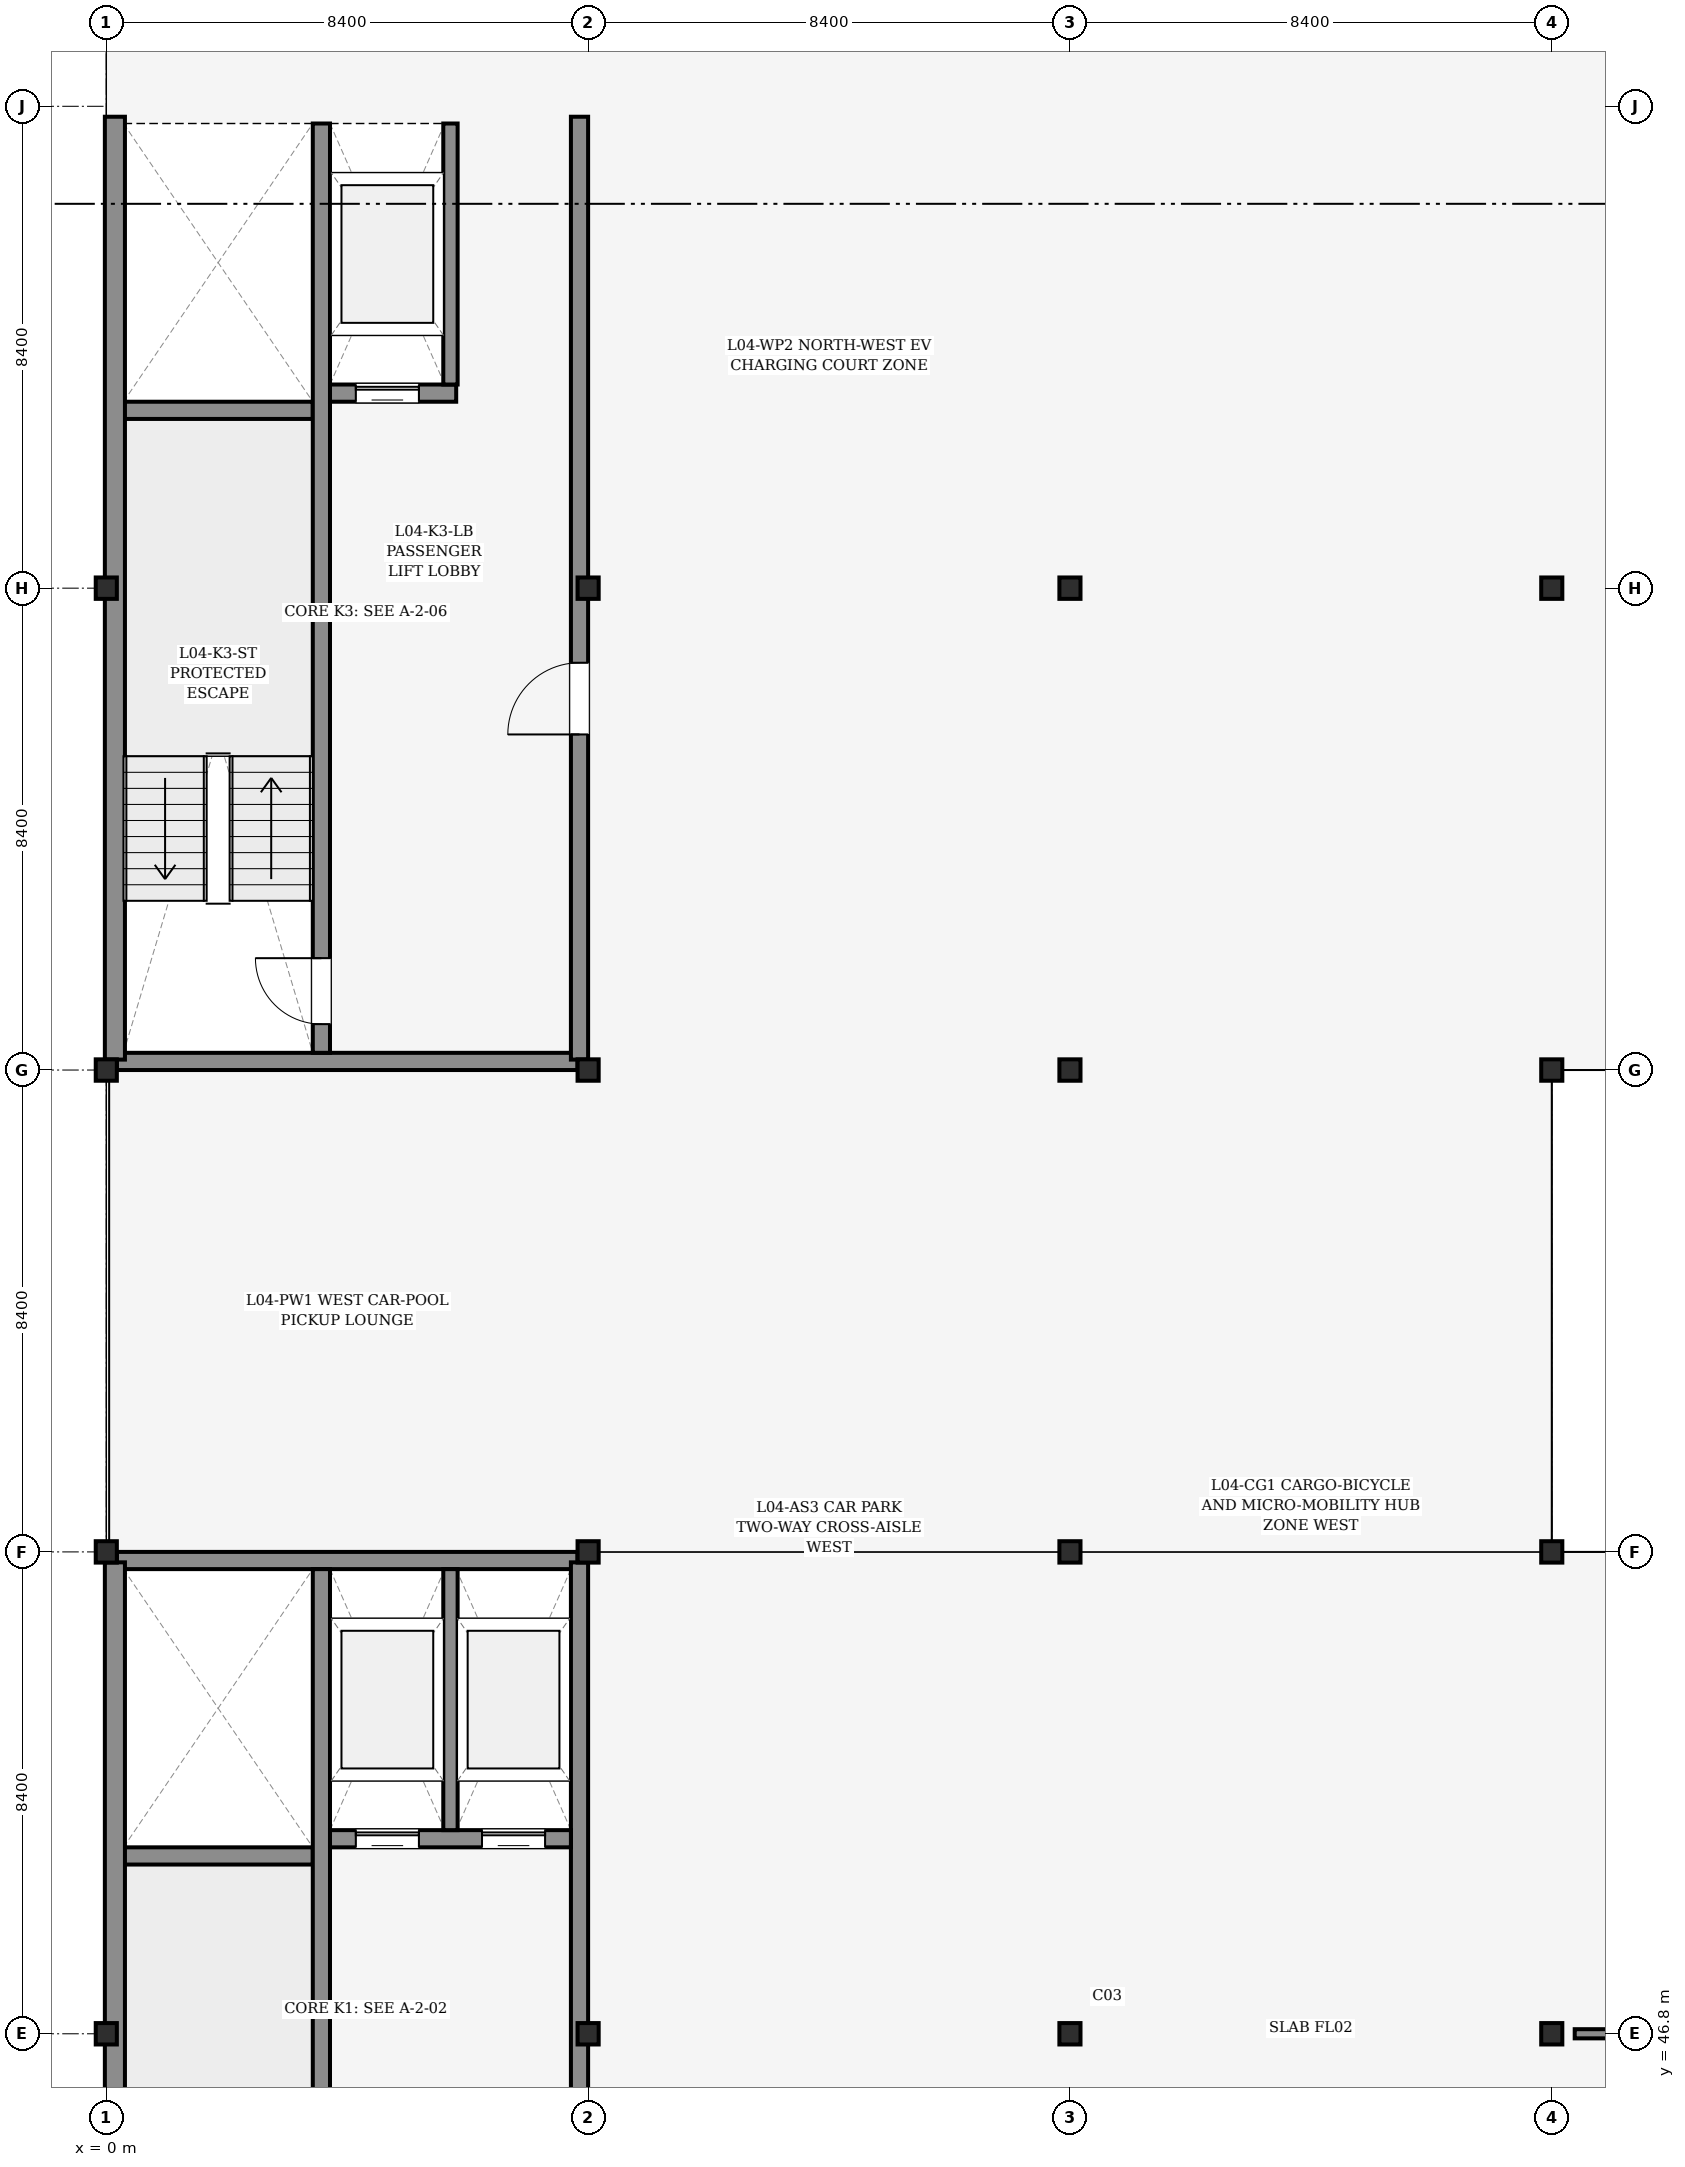
"""IFC4 building model, lengths in metres.
Left out: names, types, materials, properties, quantities, classifications, styles, units other than length and angle.
Written with IfcOpenShell. Run it as: python <this file> out.ifc"""

import sys

from ifc_helpers import new_model, si_unit, direction, frame, frame_2d, origin, origin_2d, place, context, subcontext, project, spatial, rectangle, i_section, extrude, element, fill, save


model = new_model("IFC4")
c1 = context("Model", 3, precision=1e-05, world=origin(), true_north=direction((0.0, 1.0)))
c2 = subcontext(c1, "Body", "Model", "MODEL_VIEW")
j1 = project(units=[si_unit("LENGTHUNIT", "METRE"), si_unit("PLANEANGLEUNIT", "RADIAN")], contexts=[c1])
p1 = place(None, origin())
s1 = spatial("IfcSite", under=j1, at=p1, CompositionType="ELEMENT")
p2 = place(p1, origin())
s2 = spatial("IfcBuilding", under=s1, at=p2, CompositionType="ELEMENT")
p3 = place(p2, frame((0.0, 0.0, 16.2)))
s3 = spatial("IfcBuildingStorey", under=s2, at=p3, CompositionType="ELEMENT", Elevation=16.2)
for number, where, z_axis, x_axis in (
    (1, (0.0, 46.8, 0.0), (0.0, 0.0, 1.0), (1.0, 0.0, 0.0)),
    (2, (0.0, 55.2, 0.0), (0.0, 0.0, 1.0), (1.0, 0.0, 0.0)),
    (3, (0.0, 63.6, 0.0), (0.0, 0.0, 1.0), (1.0, 0.0, 0.0)),
    (4, (0.0, 72.0, 0.0), (0.0, 0.0, 1.0), (1.0, 0.0, 0.0)),
    (5, (0.0, 80.4, 0.0), (0.0, 0.0, 1.0), (1.0, 0.0, 0.0)),
    (6, (8.4, 46.8, 0.0), (0.0, 0.0, 1.0), (1.0, 0.0, 0.0)),
    (7, (8.4, 55.2, 0.0), (0.0, 0.0, 1.0), (1.0, 0.0, 0.0)),
    (8, (8.4, 63.6, 0.0), (0.0, 0.0, 1.0), (1.0, 0.0, 0.0)),
    (9, (8.4, 72.0, 0.0), (0.0, 0.0, 1.0), (1.0, 0.0, 0.0)),
    (10, (8.4, 80.4, 0.0), (0.0, 0.0, 1.0), (1.0, 0.0, 0.0)),
    (11, (16.8, 46.8, 0.0), (0.0, 0.0, 1.0), (1.0, 0.0, 0.0)),
    (12, (16.8, 55.2, 0.0), (0.0, 0.0, 1.0), (1.0, 0.0, 0.0)),
    (13, (16.8, 63.6, 0.0), (0.0, 0.0, 1.0), (1.0, 0.0, 0.0)),
    (14, (16.8, 72.0, 0.0), (0.0, 0.0, 1.0), (1.0, 0.0, 0.0)),
    (15, (16.8, 80.4, 0.0), (0.0, 0.0, 1.0), (1.0, 0.0, 0.0)),
    (16, (25.2, 46.8, 0.0), (0.0, 0.0, 1.0), (1.0, 0.0, 0.0)),
    (17, (25.2, 55.2, 0.0), (0.0, 0.0, 1.0), (1.0, 0.0, 0.0)),
    (18, (25.2, 63.6, 0.0), (0.0, 0.0, 1.0), (1.0, 0.0, 0.0)),
    (19, (25.2, 72.0, 0.0), (0.0, 0.0, 1.0), (1.0, 0.0, 0.0)),
    (20, (25.2, 80.4, 0.0), (0.0, 0.0, 1.0), (1.0, 0.0, 0.0)),
):
    element("IfcColumn", number, at=place(p3, frame(where, z_axis=z_axis, x_axis=x_axis)), inside=s3, PredefinedType="COLUMN", context=c2, shape_type="SweptSolid", body=[
        extrude(i_section(OverallWidth=0.373, OverallDepth=0.368, WebThickness=0.014, FlangeThickness=0.024, FilletRadius=0.015, at=origin_2d()), origin(), (0.0, 0.0, 1.0), 3.6),
    ])
p4 = place(p3, frame((0.185, 55.05, 0.0), z_axis=(0.0, 0.0, 1.0), x_axis=(1.0, 0.0, 0.0)))
e21 = element("IfcWall", 21, at=p4, inside=s3, PredefinedType="SHEAR", context=c2, shape_type="SweptSolid", body=[
    extrude(rectangle(XDim=8.031, YDim=0.3, at=frame_2d((4.016, 0.0))), origin(), (0.0, 0.0, 1.0), 3.38),
])
p5 = place(p3, frame((0.3, 49.9, 0.0), z_axis=(0.0, 0.0, 1.0), x_axis=(1.0, 0.0, 0.0)))
e22 = element("IfcWall", 22, at=p5, inside=s3, PredefinedType="SHEAR", context=c2, shape_type="SweptSolid", body=[
    extrude(rectangle(XDim=3.3, YDim=0.3, at=frame_2d((1.65, 0.0))), origin(), (0.0, 0.0, 1.0), 3.38),
])
p6 = place(p3, frame((0.15, 38.582, 0.0), z_axis=(0.0, 0.0, 1.0), x_axis=(0.0, 1.0, 0.0)))
e23 = element("IfcWall", 23, at=p6, inside=s3, PredefinedType="SHEAR", context=c2, shape_type="SweptSolid", body=[
    extrude(rectangle(XDim=16.436, YDim=0.35, at=frame_2d((8.218, 0.0))), origin(), (0.0, 0.0, 1.0), 3.38),
])
p7 = place(p3, frame((8.25, 38.582, 0.0), z_axis=(0.0, 0.0, 1.0), x_axis=(0.0, 1.0, 0.0)))
e24 = element("IfcWall", 24, at=p7, inside=s3, PredefinedType="SHEAR", context=c2, shape_type="SweptSolid", body=[
    extrude(rectangle(XDim=16.436, YDim=0.3, at=frame_2d((8.218, 0.0))), origin(), (0.0, 0.0, 1.0), 3.38),
])
p8 = place(p7, frame((5.668, 0.0, 0.0)))
e25 = element("IfcOpeningElement", 25, at=p8, cuts=e24, PredefinedType="OPENING", context=c2, shape_type="SweptSolid", body=[
    extrude(rectangle(XDim=1.3, YDim=2.2, at=frame_2d((0.65, 1.1))), frame((0.0, 0.16, 0.0), z_axis=(0.0, -1.0, 0.0), x_axis=(1.0, 0.0, 0.0)), (0.0, 0.0, 1.0), 0.32),
])
p9 = place(p3, frame((3.75, 38.7, 0.0), z_axis=(0.0, 0.0, 1.0), x_axis=(0.0, 1.0, 0.0)))
e26 = element("IfcWall", 26, at=p9, inside=s3, PredefinedType="SHEAR", context=c2, shape_type="SweptSolid", body=[
    extrude(rectangle(XDim=16.2, YDim=0.3, at=frame_2d((8.1, 0.0))), origin(), (0.0, 0.0, 1.0), 3.38),
])
p10 = place(p9, frame((0.5, 0.0, 0.0)))
e27 = element("IfcOpeningElement", 27, at=p10, cuts=e26, PredefinedType="OPENING", context=c2, shape_type="SweptSolid", body=[
    extrude(rectangle(XDim=1.15, YDim=2.15, at=frame_2d((0.575, 1.075))), frame((0.0, 0.16, 0.0), z_axis=(0.0, -1.0, 0.0), x_axis=(1.0, 0.0, 0.0)), (0.0, 0.0, 1.0), 0.32),
])
p11 = place(p3, frame((3.9, 50.2, 0.0), z_axis=(0.0, 0.0, 1.0), x_axis=(1.0, 0.0, 0.0)))
e28 = element("IfcWall", 28, at=p11, inside=s3, PredefinedType="SHEAR", context=c2, shape_type="SweptSolid", body=[
    extrude(rectangle(XDim=4.2, YDim=0.3, at=frame_2d((2.1, 0.0))), origin(), (0.0, 0.0, 1.0), 3.38),
])
p12 = place(p11, frame((0.45, 0.0, 0.0)))
e29 = element("IfcOpeningElement", 29, at=p12, cuts=e28, PredefinedType="OPENING", context=c2, shape_type="SweptSolid", body=[
    extrude(rectangle(XDim=1.1, YDim=2.2, at=frame_2d((0.55, 1.1))), frame((0.0, 0.16, 0.0), z_axis=(0.0, -1.0, 0.0), x_axis=(1.0, 0.0, 0.0)), (0.0, 0.0, 1.0), 0.32),
])
p13 = place(p11, frame((2.65, 0.0, 0.0)))
e30 = element("IfcOpeningElement", 30, at=p13, cuts=e28, PredefinedType="OPENING", context=c2, shape_type="SweptSolid", body=[
    extrude(rectangle(XDim=1.1, YDim=2.2, at=frame_2d((0.55, 1.1))), frame((0.0, 0.16, 0.0), z_axis=(0.0, -1.0, 0.0), x_axis=(1.0, 0.0, 0.0)), (0.0, 0.0, 1.0), 0.32),
])
p14 = place(p3, frame((6.0, 50.35, 0.0), z_axis=(0.0, 0.0, 1.0), x_axis=(0.0, 1.0, 0.0)))
e31 = element("IfcWall", 31, at=p14, inside=s3, PredefinedType="PARTITIONING", context=c2, shape_type="SweptSolid", body=[
    extrude(rectangle(XDim=4.55, YDim=0.25, at=frame_2d((2.275, 0.0))), origin(), (0.0, 0.0, 1.0), 2.525),
])
for number, where, z_axis, x_axis in (
    (32, (0.185, 63.75, 0.0), (0.0, 0.0, 1.0), (1.0, 0.0, 0.0)),
    (33, (0.185, 80.25, 0.0), (0.0, 0.0, 1.0), (1.0, 0.0, 0.0)),
):
    element("IfcWall", number, at=place(p3, frame(where, z_axis=z_axis, x_axis=x_axis)), inside=s3, PredefinedType="SHEAR", context=c2, shape_type="SweptSolid", body=[
        extrude(rectangle(XDim=8.031, YDim=0.3, at=frame_2d((4.016, 0.0))), origin(), (0.0, 0.0, 1.0), 3.38),
    ])
p15 = place(p3, frame((0.3, 75.1, 0.0), z_axis=(0.0, 0.0, 1.0), x_axis=(1.0, 0.0, 0.0)))
e34 = element("IfcWall", 34, at=p15, inside=s3, PredefinedType="SHEAR", context=c2, shape_type="SweptSolid", body=[
    extrude(rectangle(XDim=3.3, YDim=0.3, at=frame_2d((1.65, 0.0))), origin(), (0.0, 0.0, 1.0), 3.38),
])
p16 = place(p3, frame((0.15, 63.782, 0.0), z_axis=(0.0, 0.0, 1.0), x_axis=(0.0, 1.0, 0.0)))
e35 = element("IfcWall", 35, at=p16, inside=s3, PredefinedType="SHEAR", context=c2, shape_type="SweptSolid", body=[
    extrude(rectangle(XDim=16.436, YDim=0.35, at=frame_2d((8.218, 0.0))), origin(), (0.0, 0.0, 1.0), 3.38),
])
p17 = place(p3, frame((8.25, 63.782, 0.0), z_axis=(0.0, 0.0, 1.0), x_axis=(0.0, 1.0, 0.0)))
e36 = element("IfcWall", 36, at=p17, inside=s3, PredefinedType="SHEAR", context=c2, shape_type="SweptSolid", body=[
    extrude(rectangle(XDim=16.436, YDim=0.3, at=frame_2d((8.218, 0.0))), origin(), (0.0, 0.0, 1.0), 3.38),
])
p18 = place(p17, frame((5.668, 0.0, 0.0)))
e37 = element("IfcOpeningElement", 37, at=p18, cuts=e36, PredefinedType="OPENING", context=c2, shape_type="SweptSolid", body=[
    extrude(rectangle(XDim=1.25, YDim=2.15, at=frame_2d((0.625, 1.075))), frame((0.0, 0.16, 0.0), z_axis=(0.0, -1.0, 0.0), x_axis=(1.0, 0.0, 0.0)), (0.0, 0.0, 1.0), 0.32),
])
p19 = place(p3, frame((3.75, 63.9, 0.0), z_axis=(0.0, 0.0, 1.0), x_axis=(0.0, 1.0, 0.0)))
e38 = element("IfcWall", 38, at=p19, inside=s3, PredefinedType="SHEAR", context=c2, shape_type="SweptSolid", body=[
    extrude(rectangle(XDim=16.2, YDim=0.3, at=frame_2d((8.1, 0.0))), origin(), (0.0, 0.0, 1.0), 3.38),
])
p20 = place(p19, frame((0.5, 0.0, 0.0)))
e39 = element("IfcOpeningElement", 39, at=p20, cuts=e38, PredefinedType="OPENING", context=c2, shape_type="SweptSolid", body=[
    extrude(rectangle(XDim=1.15, YDim=2.15, at=frame_2d((0.575, 1.075))), frame((0.0, 0.16, 0.0), z_axis=(0.0, -1.0, 0.0), x_axis=(1.0, 0.0, 0.0)), (0.0, 0.0, 1.0), 0.32),
])
p21 = place(p3, frame((3.9, 75.4, 0.0), z_axis=(0.0, 0.0, 1.0), x_axis=(1.0, 0.0, 0.0)))
e40 = element("IfcWall", 40, at=p21, inside=s3, PredefinedType="SHEAR", context=c2, shape_type="SweptSolid", body=[
    extrude(rectangle(XDim=2.2, YDim=0.3, at=frame_2d((1.1, 0.0))), origin(), (0.0, 0.0, 1.0), 3.38),
])
p22 = place(p21, frame((0.45, 0.0, 0.0)))
e41 = element("IfcOpeningElement", 41, at=p22, cuts=e40, PredefinedType="OPENING", context=c2, shape_type="SweptSolid", body=[
    extrude(rectangle(XDim=1.1, YDim=2.2, at=frame_2d((0.55, 1.1))), frame((0.0, 0.16, 0.0), z_axis=(0.0, -1.0, 0.0), x_axis=(1.0, 0.0, 0.0)), (0.0, 0.0, 1.0), 0.32),
])
p23 = place(p3, frame((6.0, 75.55, 0.0), z_axis=(0.0, 0.0, 1.0), x_axis=(0.0, 1.0, 0.0)))
e42 = element("IfcWall", 42, at=p23, inside=s3, PredefinedType="PARTITIONING", context=c2, shape_type="SweptSolid", body=[
    extrude(rectangle(XDim=4.55, YDim=0.25, at=frame_2d((2.275, 0.0))), origin(), (0.0, 0.0, 1.0), 2.525),
])
p24 = place(p3, frame((25.6, 46.8, 0.0), z_axis=(0.0, 0.0, 1.0), x_axis=(1.0, 0.0, 0.0)))
e43 = element("IfcWall", 43, at=p24, inside=s3, PredefinedType="PARTITIONING", context=c2, shape_type="SweptSolid", body=[
    extrude(rectangle(XDim=32.8, YDim=0.16, at=frame_2d((16.4, 0.0))), origin(), (0.0, 0.0, 1.0), 2.525),
])
p25 = place(p24, frame((4.0, 0.0, 0.0)))
e44 = element("IfcOpeningElement", 44, at=p25, cuts=e43, PredefinedType="OPENING", context=c2, shape_type="SweptSolid", body=[
    extrude(rectangle(XDim=1.2, YDim=2.15, at=frame_2d((0.6, 1.075))), frame((0.0, 0.09, 0.0), z_axis=(0.0, -1.0, 0.0), x_axis=(1.0, 0.0, 0.0)), (0.0, 0.0, 1.0), 0.18),
])
p26 = place(p12, origin())
e45 = element("IfcDoor", 45, at=p26, inside=s3, OperationType="SLIDING_TO_LEFT", PredefinedType="DOOR", context=c2, shape_type="SweptSolid", body=[
    extrude(rectangle(XDim=1.1, YDim=2.2, at=frame_2d((0.55, 1.1))), frame((0.0, 0.025, 0.0), z_axis=(0.0, -1.0, 0.0), x_axis=(1.0, 0.0, 0.0)), (0.0, 0.0, 1.0), 0.05),
])
fill(e29, e45)
p27 = place(p13, origin())
e46 = element("IfcDoor", 46, at=p27, inside=s3, OperationType="SLIDING_TO_LEFT", PredefinedType="DOOR", context=c2, shape_type="SweptSolid", body=[
    extrude(rectangle(XDim=1.1, YDim=2.2, at=frame_2d((0.55, 1.1))), frame((0.0, 0.025, 0.0), z_axis=(0.0, -1.0, 0.0), x_axis=(1.0, 0.0, 0.0)), (0.0, 0.0, 1.0), 0.05),
])
fill(e30, e46)
p28 = place(p18, origin())
e47 = element("IfcDoor", 47, at=p28, inside=s3, OperationType="SINGLE_SWING_LEFT", PredefinedType="DOOR", context=c2, shape_type="SweptSolid", body=[
    extrude(rectangle(XDim=1.25, YDim=2.15, at=frame_2d((0.625, 1.075))), frame((0.0, 0.025, 0.0), z_axis=(0.0, -1.0, 0.0), x_axis=(1.0, 0.0, 0.0)), (0.0, 0.0, 1.0), 0.05),
])
fill(e37, e47)
p29 = place(p20, frame((1.15, 0.0, 0.0), z_axis=(0.0, 0.0, 1.0), x_axis=(-1.0, 0.0, 0.0)))
e48 = element("IfcDoor", 48, at=p29, inside=s3, OperationType="SINGLE_SWING_LEFT", PredefinedType="DOOR", context=c2, shape_type="SweptSolid", body=[
    extrude(rectangle(XDim=1.15, YDim=2.15, at=frame_2d((0.575, 1.075))), frame((0.0, 0.025, 0.0), z_axis=(0.0, -1.0, 0.0), x_axis=(1.0, 0.0, 0.0)), (0.0, 0.0, 1.0), 0.05),
])
fill(e39, e48)
p30 = place(p22, origin())
e49 = element("IfcDoor", 49, at=p30, inside=s3, OperationType="SLIDING_TO_LEFT", PredefinedType="DOOR", context=c2, shape_type="SweptSolid", body=[
    extrude(rectangle(XDim=1.1, YDim=2.2, at=frame_2d((0.55, 1.1))), frame((0.0, 0.025, 0.0), z_axis=(0.0, -1.0, 0.0), x_axis=(1.0, 0.0, 0.0)), (0.0, 0.0, 1.0), 0.05),
])
fill(e41, e49)
save(model, sys.argv[1])
